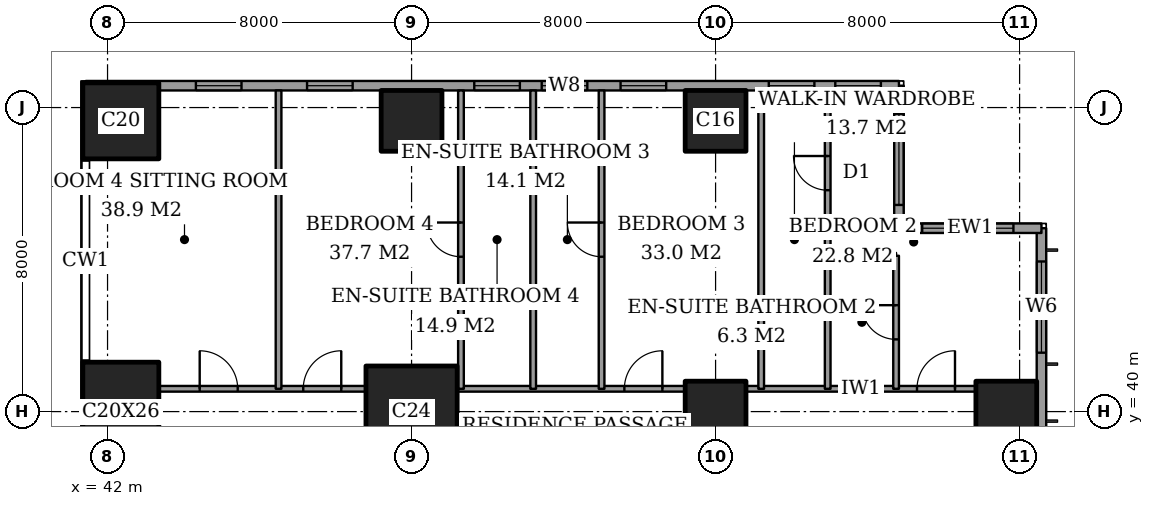
"""IFC4 building model, lengths in metres.
Left out: names, types, materials, properties, quantities, classifications, styles, units other than length and angle.
Written with IfcOpenShell. Run it as: python <this file> out.ifc"""

import sys

from ifc_helpers import new_model, si_unit, direction, frame, frame_2d, origin, origin_2d, place, context, subcontext, project, spatial, rectangle, extrude, element, fill, save


model = new_model("IFC4")
c1 = context("Model", 3, precision=1e-05, world=origin(), true_north=direction((0.0, 1.0)))
c2 = subcontext(c1, "Body", "Model", "MODEL_VIEW")
j1 = project(units=[si_unit("LENGTHUNIT", "METRE"), si_unit("PLANEANGLEUNIT", "RADIAN")], contexts=[c1])
p1 = place(None, origin())
s1 = spatial("IfcSite", under=j1, at=p1, CompositionType="ELEMENT")
p2 = place(p1, origin())
s2 = spatial("IfcBuilding", under=s1, at=p2, CompositionType="ELEMENT")
p3 = place(p2, frame((0.0, 0.0, 273.6)))
s3 = spatial("IfcBuildingStorey", under=s2, at=p3, CompositionType="ELEMENT", Elevation=273.6)
p4 = place(p3, frame((42.35, 40.0, 0.0), z_axis=(0.0, 0.0, 1.0), x_axis=(1.0, 0.0, 0.0)))
e1 = element("IfcColumn", 1, at=p4, inside=s3, PredefinedType="COLUMN", context=c2, shape_type="SweptSolid", body=[
    extrude(rectangle(XDim=2.0, YDim=2.6, at=origin_2d()), origin(), (0.0, 0.0, 1.0), 3.6),
])
p5 = place(p3, frame((42.35, 47.65, 0.0), z_axis=(0.0, 0.0, 1.0), x_axis=(1.0, 0.0, 0.0)))
e2 = element("IfcColumn", 2, at=p5, inside=s3, PredefinedType="COLUMN", context=c2, shape_type="SweptSolid", body=[
    extrude(rectangle(XDim=2.0, YDim=2.0, at=origin_2d()), origin(), (0.0, 0.0, 1.0), 3.6),
])
p6 = place(p3, frame((50.0, 40.0, 0.0), z_axis=(0.0, 0.0, 1.0), x_axis=(1.0, 0.0, 0.0)))
e3 = element("IfcColumn", 3, at=p6, inside=s3, PredefinedType="COLUMN", context=c2, shape_type="SweptSolid", body=[
    extrude(rectangle(XDim=2.4, YDim=2.4, at=origin_2d()), origin(), (0.0, 0.0, 1.0), 3.6),
])
for number, where, z_axis, x_axis in (
    (4, (50.0, 47.65, 0.0), (0.0, 0.0, 1.0), (1.0, 0.0, 0.0)),
    (5, (58.0, 40.0, 0.0), (0.0, 0.0, 1.0), (1.0, 0.0, 0.0)),
    (6, (58.0, 47.65, 0.0), (0.0, 0.0, 1.0), (1.0, 0.0, 0.0)),
    (7, (65.65, 40.0, 0.0), (0.0, 0.0, 1.0), (1.0, 0.0, 0.0)),
):
    element("IfcColumn", number, at=place(p3, frame(where, z_axis=z_axis, x_axis=x_axis)), inside=s3, PredefinedType="COLUMN", context=c2, shape_type="SweptSolid", body=[
        extrude(rectangle(XDim=1.6, YDim=1.6, at=origin_2d()), origin(), (0.0, 0.0, 1.0), 3.6),
    ])
p7 = place(p3, frame((66.575, 3.175, 0.0), z_axis=(0.0, 0.0, 1.0), x_axis=(0.0, 1.0, 0.0)))
e8 = element("IfcWall", 8, at=p7, inside=s3, PredefinedType="SOLIDWALL", context=c2, shape_type="SweptSolid", body=[
    extrude(rectangle(XDim=41.65, YDim=0.25, at=frame_2d((20.825, 0.0))), origin(), (0.0, 0.0, 1.0), 3.6),
])
p8 = place(p7, frame((0.875, 0.0, 0.6)))
e9 = element("IfcOpeningElement", 9, at=p8, cuts=e8, PredefinedType="OPENING", context=c2, shape_type="SweptSolid", body=[
    extrude(rectangle(XDim=2.4, YDim=2.0, at=frame_2d((1.2, 1.0))), frame((0.0, 0.135, 0.0), z_axis=(0.0, -1.0, 0.0), x_axis=(1.0, 0.0, 0.0)), (0.0, 0.0, 1.0), 0.27),
])
p9 = place(p7, frame((6.0, 0.0, 0.6)))
e10 = element("IfcOpeningElement", 10, at=p9, cuts=e8, PredefinedType="OPENING", context=c2, shape_type="SweptSolid", body=[
    extrude(rectangle(XDim=1.2, YDim=2.0, at=frame_2d((0.6, 1.0))), frame((0.0, 0.135, 0.0), z_axis=(0.0, -1.0, 0.0), x_axis=(1.0, 0.0, 0.0)), (0.0, 0.0, 1.0), 0.27),
])
p10 = place(p7, frame((8.525, 0.0, 0.6)))
e11 = element("IfcOpeningElement", 11, at=p10, cuts=e8, PredefinedType="OPENING", context=c2, shape_type="SweptSolid", body=[
    extrude(rectangle(XDim=2.4, YDim=2.0, at=frame_2d((1.2, 1.0))), frame((0.0, 0.135, 0.0), z_axis=(0.0, -1.0, 0.0), x_axis=(1.0, 0.0, 0.0)), (0.0, 0.0, 1.0), 0.27),
])
p11 = place(p7, frame((15.725, 0.0, 0.6)))
e12 = element("IfcOpeningElement", 12, at=p11, cuts=e8, PredefinedType="OPENING", context=c2, shape_type="SweptSolid", body=[
    extrude(rectangle(XDim=2.4, YDim=2.0, at=frame_2d((1.2, 1.0))), frame((0.0, 0.135, 0.0), z_axis=(0.0, -1.0, 0.0), x_axis=(1.0, 0.0, 0.0)), (0.0, 0.0, 1.0), 0.27),
])
p12 = place(p7, frame((23.625, 0.0, 0.6)))
e13 = element("IfcOpeningElement", 13, at=p12, cuts=e8, PredefinedType="OPENING", context=c2, shape_type="SweptSolid", body=[
    extrude(rectangle(XDim=2.4, YDim=2.0, at=frame_2d((1.2, 1.0))), frame((0.0, 0.135, 0.0), z_axis=(0.0, -1.0, 0.0), x_axis=(1.0, 0.0, 0.0)), (0.0, 0.0, 1.0), 0.27),
])
p13 = place(p7, frame((30.725, 0.0, 0.6)))
e14 = element("IfcOpeningElement", 14, at=p13, cuts=e8, PredefinedType="OPENING", context=c2, shape_type="SweptSolid", body=[
    extrude(rectangle(XDim=2.4, YDim=2.0, at=frame_2d((1.2, 1.0))), frame((0.0, 0.135, 0.0), z_axis=(0.0, -1.0, 0.0), x_axis=(1.0, 0.0, 0.0)), (0.0, 0.0, 1.0), 0.27),
])
p14 = place(p7, frame((34.525, 0.0, 0.6)))
e15 = element("IfcOpeningElement", 15, at=p14, cuts=e8, PredefinedType="OPENING", context=c2, shape_type="SweptSolid", body=[
    extrude(rectangle(XDim=1.2, YDim=2.0, at=frame_2d((0.6, 1.0))), frame((0.0, 0.135, 0.0), z_axis=(0.0, -1.0, 0.0), x_axis=(1.0, 0.0, 0.0)), (0.0, 0.0, 1.0), 0.27),
])
p15 = place(p7, frame((38.375, 0.0, 0.6)))
e16 = element("IfcOpeningElement", 16, at=p15, cuts=e8, PredefinedType="OPENING", context=c2, shape_type="SweptSolid", body=[
    extrude(rectangle(XDim=2.4, YDim=2.0, at=frame_2d((1.2, 1.0))), frame((0.0, 0.135, 0.0), z_axis=(0.0, -1.0, 0.0), x_axis=(1.0, 0.0, 0.0)), (0.0, 0.0, 1.0), 0.27),
])
p16 = place(p3, frame((66.575, 44.825, 0.0), z_axis=(0.0, 0.0, 1.0), x_axis=(-1.0, 0.0, 0.0)))
e17 = element("IfcWall", 17, at=p16, inside=s3, PredefinedType="SOLIDWALL", context=c2, shape_type="SweptSolid", body=[
    extrude(rectangle(XDim=3.75, YDim=0.25, at=frame_2d((1.875, 0.0))), origin(), (0.0, 0.0, 1.0), 3.6),
])
p17 = place(p16, frame((0.738, 0.0, 0.6)))
e18 = element("IfcOpeningElement", 18, at=p17, cuts=e17, PredefinedType="OPENING", context=c2, shape_type="SweptSolid", body=[
    extrude(rectangle(XDim=2.4, YDim=2.0, at=frame_2d((1.2, 1.0))), frame((0.0, 0.135, 0.0), z_axis=(0.0, -1.0, 0.0), x_axis=(1.0, 0.0, 0.0)), (0.0, 0.0, 1.0), 0.27),
])
p18 = place(p3, frame((62.825, 44.825, 0.0), z_axis=(0.0, 0.0, 1.0), x_axis=(0.0, 1.0, 0.0)))
e19 = element("IfcWall", 19, at=p18, inside=s3, PredefinedType="SOLIDWALL", context=c2, shape_type="SweptSolid", body=[
    extrude(rectangle(XDim=3.75, YDim=0.25, at=frame_2d((1.875, 0.0))), origin(), (0.0, 0.0, 1.0), 3.6),
])
p19 = place(p18, frame((0.613, 0.0, 0.6)))
e20 = element("IfcOpeningElement", 20, at=p19, cuts=e19, PredefinedType="OPENING", context=c2, shape_type="SweptSolid", body=[
    extrude(rectangle(XDim=2.4, YDim=2.0, at=frame_2d((1.2, 1.0))), frame((0.0, 0.135, 0.0), z_axis=(0.0, -1.0, 0.0), x_axis=(1.0, 0.0, 0.0)), (0.0, 0.0, 1.0), 0.27),
])
p20 = place(p3, frame((62.825, 48.575, 0.0), z_axis=(0.0, 0.0, 1.0), x_axis=(-1.0, 0.0, 0.0)))
e21 = element("IfcWall", 21, at=p20, inside=s3, PredefinedType="SOLIDWALL", context=c2, shape_type="SweptSolid", body=[
    extrude(rectangle(XDim=21.4, YDim=0.25, at=frame_2d((10.7, 0.0))), origin(), (0.0, 0.0, 1.0), 3.6),
])
p21 = place(p20, frame((0.475, 0.0, 0.6)))
e22 = element("IfcOpeningElement", 22, at=p21, cuts=e21, PredefinedType="OPENING", context=c2, shape_type="SweptSolid", body=[
    extrude(rectangle(XDim=1.2, YDim=2.0, at=frame_2d((0.6, 1.0))), frame((0.0, 0.135, 0.0), z_axis=(0.0, -1.0, 0.0), x_axis=(1.0, 0.0, 0.0)), (0.0, 0.0, 1.0), 0.27),
])
p22 = place(p20, frame((2.225, 0.0, 0.6)))
e23 = element("IfcOpeningElement", 23, at=p22, cuts=e21, PredefinedType="OPENING", context=c2, shape_type="SweptSolid", body=[
    extrude(rectangle(XDim=1.2, YDim=2.0, at=frame_2d((0.6, 1.0))), frame((0.0, 0.135, 0.0), z_axis=(0.0, -1.0, 0.0), x_axis=(1.0, 0.0, 0.0)), (0.0, 0.0, 1.0), 0.27),
])
p23 = place(p20, frame((6.125, 0.0, 0.6)))
e24 = element("IfcOpeningElement", 24, at=p23, cuts=e21, PredefinedType="OPENING", context=c2, shape_type="SweptSolid", body=[
    extrude(rectangle(XDim=1.2, YDim=2.0, at=frame_2d((0.6, 1.0))), frame((0.0, 0.135, 0.0), z_axis=(0.0, -1.0, 0.0), x_axis=(1.0, 0.0, 0.0)), (0.0, 0.0, 1.0), 0.27),
])
p24 = place(p20, frame((8.2, 0.0, 0.6)))
e25 = element("IfcOpeningElement", 25, at=p24, cuts=e21, PredefinedType="OPENING", context=c2, shape_type="SweptSolid", body=[
    extrude(rectangle(XDim=1.2, YDim=2.0, at=frame_2d((0.6, 1.0))), frame((0.0, 0.135, 0.0), z_axis=(0.0, -1.0, 0.0), x_axis=(1.0, 0.0, 0.0)), (0.0, 0.0, 1.0), 0.27),
])
p25 = place(p20, frame((9.975, 0.0, 0.6)))
e26 = element("IfcOpeningElement", 26, at=p25, cuts=e21, PredefinedType="OPENING", context=c2, shape_type="SweptSolid", body=[
    extrude(rectangle(XDim=1.2, YDim=2.0, at=frame_2d((0.6, 1.0))), frame((0.0, 0.135, 0.0), z_axis=(0.0, -1.0, 0.0), x_axis=(1.0, 0.0, 0.0)), (0.0, 0.0, 1.0), 0.27),
])
p26 = place(p20, frame((14.375, 0.0, 0.6)))
e27 = element("IfcOpeningElement", 27, at=p26, cuts=e21, PredefinedType="OPENING", context=c2, shape_type="SweptSolid", body=[
    extrude(rectangle(XDim=1.2, YDim=2.0, at=frame_2d((0.6, 1.0))), frame((0.0, 0.135, 0.0), z_axis=(0.0, -1.0, 0.0), x_axis=(1.0, 0.0, 0.0)), (0.0, 0.0, 1.0), 0.27),
])
p27 = place(p20, frame((17.3, 0.0, 0.6)))
e28 = element("IfcOpeningElement", 28, at=p27, cuts=e21, PredefinedType="OPENING", context=c2, shape_type="SweptSolid", body=[
    extrude(rectangle(XDim=1.2, YDim=2.0, at=frame_2d((0.6, 1.0))), frame((0.0, 0.135, 0.0), z_axis=(0.0, -1.0, 0.0), x_axis=(1.0, 0.0, 0.0)), (0.0, 0.0, 1.0), 0.27),
])
p28 = place(p3, frame((43.35, 40.6, 0.0), z_axis=(0.0, 0.0, 1.0), x_axis=(1.0, 0.0, 0.0)))
e29 = element("IfcWall", 29, at=p28, inside=s3, PredefinedType="PARTITIONING", context=c2, shape_type="SweptSolid", body=[
    extrude(rectangle(XDim=5.45, YDim=0.15, at=frame_2d((2.725, 0.0))), origin(), (0.0, 0.0, 1.0), 3.25),
])
p29 = place(p28, frame((3.8, 0.0, 0.0)))
e30 = element("IfcOpeningElement", 30, at=p29, cuts=e29, PredefinedType="OPENING", context=c2, shape_type="SweptSolid", body=[
    extrude(rectangle(XDim=1.0, YDim=2.1, at=frame_2d((0.5, 1.05))), frame((0.0, 0.085, 0.0), z_axis=(0.0, -1.0, 0.0), x_axis=(1.0, 0.0, 0.0)), (0.0, 0.0, 1.0), 0.17),
])
p30 = place(p28, frame((1.075, 0.0, 0.0)))
e31 = element("IfcOpeningElement", 31, at=p30, cuts=e29, PredefinedType="OPENING", context=c2, shape_type="SweptSolid", body=[
    extrude(rectangle(XDim=1.0, YDim=2.1, at=frame_2d((0.5, 1.05))), frame((0.0, 0.085, 0.0), z_axis=(0.0, -1.0, 0.0), x_axis=(1.0, 0.0, 0.0)), (0.0, 0.0, 1.0), 0.17),
])
p31 = place(p3, frame((51.2, 40.6, 0.0), z_axis=(0.0, 0.0, 1.0), x_axis=(1.0, 0.0, 0.0)))
e32 = element("IfcWall", 32, at=p31, inside=s3, PredefinedType="PARTITIONING", context=c2, shape_type="SweptSolid", body=[
    extrude(rectangle(XDim=6.0, YDim=0.15, at=frame_2d((3.0, 0.0))), origin(), (0.0, 0.0, 1.0), 3.25),
])
p32 = place(p31, frame((4.4, 0.0, 0.0)))
e33 = element("IfcOpeningElement", 33, at=p32, cuts=e32, PredefinedType="OPENING", context=c2, shape_type="SweptSolid", body=[
    extrude(rectangle(XDim=1.0, YDim=2.1, at=frame_2d((0.5, 1.05))), frame((0.0, 0.085, 0.0), z_axis=(0.0, -1.0, 0.0), x_axis=(1.0, 0.0, 0.0)), (0.0, 0.0, 1.0), 0.17),
])
p33 = place(p3, frame((58.8, 40.6, 0.0), z_axis=(0.0, 0.0, 1.0), x_axis=(1.0, 0.0, 0.0)))
e34 = element("IfcWall", 34, at=p33, inside=s3, PredefinedType="PARTITIONING", context=c2, shape_type="SweptSolid", body=[
    extrude(rectangle(XDim=6.05, YDim=0.15, at=frame_2d((3.025, 0.0))), origin(), (0.0, 0.0, 1.0), 3.25),
])
p34 = place(p33, frame((4.5, 0.0, 0.0)))
e35 = element("IfcOpeningElement", 35, at=p34, cuts=e34, PredefinedType="OPENING", context=c2, shape_type="SweptSolid", body=[
    extrude(rectangle(XDim=1.0, YDim=2.1, at=frame_2d((0.5, 1.05))), frame((0.0, 0.085, 0.0), z_axis=(0.0, -1.0, 0.0), x_axis=(1.0, 0.0, 0.0)), (0.0, 0.0, 1.0), 0.17),
])
p35 = place(p3, frame((60.95, 44.1, 0.0), z_axis=(0.0, 0.0, 1.0), x_axis=(1.0, 0.0, 0.0)))
e36 = element("IfcWall", 36, at=p35, inside=s3, PredefinedType="PARTITIONING", context=c2, shape_type="SweptSolid", body=[
    extrude(rectangle(XDim=1.8, YDim=0.15, at=frame_2d((0.9, 0.0))), origin(), (0.0, 0.0, 1.0), 3.25),
])
p36 = place(p3, frame((46.5, 40.6, 0.0), z_axis=(0.0, 0.0, 1.0), x_axis=(0.0, 1.0, 0.0)))
e37 = element("IfcWall", 37, at=p36, inside=s3, PredefinedType="PARTITIONING", context=c2, shape_type="SweptSolid", body=[
    extrude(rectangle(XDim=7.85, YDim=0.15, at=frame_2d((3.925, 0.0))), origin(), (0.0, 0.0, 1.0), 3.25),
])
p37 = place(p3, frame((51.3, 40.6, 0.0), z_axis=(0.0, 0.0, 1.0), x_axis=(0.0, 1.0, 0.0)))
e38 = element("IfcWall", 38, at=p37, inside=s3, PredefinedType="PARTITIONING", context=c2, shape_type="SweptSolid", body=[
    extrude(rectangle(XDim=7.85, YDim=0.15, at=frame_2d((3.925, 0.0))), origin(), (0.0, 0.0, 1.0), 3.25),
])
p38 = place(p37, frame((3.475, 0.0, 0.0)))
e39 = element("IfcOpeningElement", 39, at=p38, cuts=e38, PredefinedType="OPENING", context=c2, shape_type="SweptSolid", body=[
    extrude(rectangle(XDim=0.9, YDim=2.1, at=frame_2d((0.45, 1.05))), frame((0.0, 0.085, 0.0), z_axis=(0.0, -1.0, 0.0), x_axis=(1.0, 0.0, 0.0)), (0.0, 0.0, 1.0), 0.17),
])
p39 = place(p3, frame((53.2, 40.6, 0.0), z_axis=(0.0, 0.0, 1.0), x_axis=(0.0, 1.0, 0.0)))
e40 = element("IfcWall", 40, at=p39, inside=s3, PredefinedType="PARTITIONING", context=c2, shape_type="SweptSolid", body=[
    extrude(rectangle(XDim=7.85, YDim=0.15, at=frame_2d((3.925, 0.0))), origin(), (0.0, 0.0, 1.0), 3.25),
])
p40 = place(p3, frame((55.0, 40.6, 0.0), z_axis=(0.0, 0.0, 1.0), x_axis=(0.0, 1.0, 0.0)))
e41 = element("IfcWall", 41, at=p40, inside=s3, PredefinedType="PARTITIONING", context=c2, shape_type="SweptSolid", body=[
    extrude(rectangle(XDim=7.85, YDim=0.15, at=frame_2d((3.925, 0.0))), origin(), (0.0, 0.0, 1.0), 3.25),
])
p41 = place(p40, frame((3.475, 0.0, 0.0)))
e42 = element("IfcOpeningElement", 42, at=p41, cuts=e41, PredefinedType="OPENING", context=c2, shape_type="SweptSolid", body=[
    extrude(rectangle(XDim=0.9, YDim=2.1, at=frame_2d((0.45, 1.05))), frame((0.0, 0.085, 0.0), z_axis=(0.0, -1.0, 0.0), x_axis=(1.0, 0.0, 0.0)), (0.0, 0.0, 1.0), 0.17),
])
p42 = place(p3, frame((59.2, 40.6, 0.0), z_axis=(0.0, 0.0, 1.0), x_axis=(0.0, 1.0, 0.0)))
e43 = element("IfcWall", 43, at=p42, inside=s3, PredefinedType="PARTITIONING", context=c2, shape_type="SweptSolid", body=[
    extrude(rectangle(XDim=7.85, YDim=0.15, at=frame_2d((3.925, 0.0))), origin(), (0.0, 0.0, 1.0), 3.25),
])
p43 = place(p3, frame((60.95, 40.6, 0.0), z_axis=(0.0, 0.0, 1.0), x_axis=(0.0, 1.0, 0.0)))
e44 = element("IfcWall", 44, at=p43, inside=s3, PredefinedType="PARTITIONING", context=c2, shape_type="SweptSolid", body=[
    extrude(rectangle(XDim=7.85, YDim=0.15, at=frame_2d((3.925, 0.0))), origin(), (0.0, 0.0, 1.0), 3.25),
])
p44 = place(p43, frame((5.225, 0.0, 0.0)))
e45 = element("IfcOpeningElement", 45, at=p44, cuts=e44, PredefinedType="OPENING", context=c2, shape_type="SweptSolid", body=[
    extrude(rectangle(XDim=0.9, YDim=2.1, at=frame_2d((0.45, 1.05))), frame((0.0, 0.085, 0.0), z_axis=(0.0, -1.0, 0.0), x_axis=(1.0, 0.0, 0.0)), (0.0, 0.0, 1.0), 0.17),
])
p45 = place(p3, frame((62.75, 40.6, 0.0), z_axis=(0.0, 0.0, 1.0), x_axis=(0.0, 1.0, 0.0)))
e46 = element("IfcWall", 46, at=p45, inside=s3, PredefinedType="PARTITIONING", context=c2, shape_type="SweptSolid", body=[
    extrude(rectangle(XDim=3.5, YDim=0.15, at=frame_2d((1.75, 0.0))), origin(), (0.0, 0.0, 1.0), 3.25),
])
p46 = place(p45, frame((1.3, 0.0, 0.0)))
e47 = element("IfcOpeningElement", 47, at=p46, cuts=e46, PredefinedType="OPENING", context=c2, shape_type="SweptSolid", body=[
    extrude(rectangle(XDim=0.9, YDim=2.1, at=frame_2d((0.45, 1.05))), frame((0.0, 0.085, 0.0), z_axis=(0.0, -1.0, 0.0), x_axis=(1.0, 0.0, 0.0)), (0.0, 0.0, 1.0), 0.17),
])
p47 = place(p15, origin())
e48 = element("IfcWindow", 48, at=p47, inside=s3, PartitioningType="SINGLE_PANEL", PredefinedType="WINDOW", context=c2, shape_type="SweptSolid", body=[
    extrude(rectangle(XDim=2.4, YDim=2.0, at=frame_2d((1.2, 1.0))), frame((0.0, 0.03, 0.0), z_axis=(0.0, -1.0, 0.0), x_axis=(1.0, 0.0, 0.0)), (0.0, 0.0, 1.0), 0.06),
])
fill(e16, e48)
p48 = place(p17, origin())
e49 = element("IfcWindow", 49, at=p48, inside=s3, PartitioningType="SINGLE_PANEL", PredefinedType="WINDOW", context=c2, shape_type="SweptSolid", body=[
    extrude(rectangle(XDim=2.4, YDim=2.0, at=frame_2d((1.2, 1.0))), frame((0.0, 0.03, 0.0), z_axis=(0.0, -1.0, 0.0), x_axis=(1.0, 0.0, 0.0)), (0.0, 0.0, 1.0), 0.06),
])
fill(e18, e49)
p49 = place(p19, origin())
e50 = element("IfcWindow", 50, at=p49, inside=s3, PartitioningType="SINGLE_PANEL", PredefinedType="WINDOW", context=c2, shape_type="SweptSolid", body=[
    extrude(rectangle(XDim=2.4, YDim=2.0, at=frame_2d((1.2, 1.0))), frame((0.0, 0.03, 0.0), z_axis=(0.0, -1.0, 0.0), x_axis=(1.0, 0.0, 0.0)), (0.0, 0.0, 1.0), 0.06),
])
fill(e20, e50)
p50 = place(p21, origin())
e51 = element("IfcWindow", 51, at=p50, inside=s3, PartitioningType="SINGLE_PANEL", PredefinedType="WINDOW", context=c2, shape_type="SweptSolid", body=[
    extrude(rectangle(XDim=1.2, YDim=2.0, at=frame_2d((0.6, 1.0))), frame((0.0, 0.03, 0.0), z_axis=(0.0, -1.0, 0.0), x_axis=(1.0, 0.0, 0.0)), (0.0, 0.0, 1.0), 0.06),
])
fill(e22, e51)
p51 = place(p22, origin())
e52 = element("IfcWindow", 52, at=p51, inside=s3, PartitioningType="SINGLE_PANEL", PredefinedType="WINDOW", context=c2, shape_type="SweptSolid", body=[
    extrude(rectangle(XDim=1.2, YDim=2.0, at=frame_2d((0.6, 1.0))), frame((0.0, 0.03, 0.0), z_axis=(0.0, -1.0, 0.0), x_axis=(1.0, 0.0, 0.0)), (0.0, 0.0, 1.0), 0.06),
])
fill(e23, e52)
p52 = place(p23, origin())
e53 = element("IfcWindow", 53, at=p52, inside=s3, PartitioningType="SINGLE_PANEL", PredefinedType="WINDOW", context=c2, shape_type="SweptSolid", body=[
    extrude(rectangle(XDim=1.2, YDim=2.0, at=frame_2d((0.6, 1.0))), frame((0.0, 0.03, 0.0), z_axis=(0.0, -1.0, 0.0), x_axis=(1.0, 0.0, 0.0)), (0.0, 0.0, 1.0), 0.06),
])
fill(e24, e53)
p53 = place(p24, origin())
e54 = element("IfcWindow", 54, at=p53, inside=s3, PartitioningType="SINGLE_PANEL", PredefinedType="WINDOW", context=c2, shape_type="SweptSolid", body=[
    extrude(rectangle(XDim=1.2, YDim=2.0, at=frame_2d((0.6, 1.0))), frame((0.0, 0.03, 0.0), z_axis=(0.0, -1.0, 0.0), x_axis=(1.0, 0.0, 0.0)), (0.0, 0.0, 1.0), 0.06),
])
fill(e25, e54)
p54 = place(p25, origin())
e55 = element("IfcWindow", 55, at=p54, inside=s3, PartitioningType="SINGLE_PANEL", PredefinedType="WINDOW", context=c2, shape_type="SweptSolid", body=[
    extrude(rectangle(XDim=1.2, YDim=2.0, at=frame_2d((0.6, 1.0))), frame((0.0, 0.03, 0.0), z_axis=(0.0, -1.0, 0.0), x_axis=(1.0, 0.0, 0.0)), (0.0, 0.0, 1.0), 0.06),
])
fill(e26, e55)
p55 = place(p26, origin())
e56 = element("IfcWindow", 56, at=p55, inside=s3, PartitioningType="SINGLE_PANEL", PredefinedType="WINDOW", context=c2, shape_type="SweptSolid", body=[
    extrude(rectangle(XDim=1.2, YDim=2.0, at=frame_2d((0.6, 1.0))), frame((0.0, 0.03, 0.0), z_axis=(0.0, -1.0, 0.0), x_axis=(1.0, 0.0, 0.0)), (0.0, 0.0, 1.0), 0.06),
])
fill(e27, e56)
p56 = place(p27, origin())
e57 = element("IfcWindow", 57, at=p56, inside=s3, PartitioningType="SINGLE_PANEL", PredefinedType="WINDOW", context=c2, shape_type="SweptSolid", body=[
    extrude(rectangle(XDim=1.2, YDim=2.0, at=frame_2d((0.6, 1.0))), frame((0.0, 0.03, 0.0), z_axis=(0.0, -1.0, 0.0), x_axis=(1.0, 0.0, 0.0)), (0.0, 0.0, 1.0), 0.06),
])
fill(e28, e57)
p57 = place(p46, origin())
e58 = element("IfcDoor", 58, at=p57, inside=s3, OperationType="SINGLE_SWING_LEFT", PredefinedType="DOOR", context=c2, shape_type="SweptSolid", body=[
    extrude(rectangle(XDim=0.9, YDim=2.1, at=frame_2d((0.45, 1.05))), frame((0.0, 0.025, 0.0), z_axis=(0.0, -1.0, 0.0), x_axis=(1.0, 0.0, 0.0)), (0.0, 0.0, 1.0), 0.05),
])
fill(e47, e58)
p58 = place(p34, origin())
e59 = element("IfcDoor", 59, at=p58, inside=s3, OperationType="SINGLE_SWING_LEFT", PredefinedType="DOOR", context=c2, shape_type="SweptSolid", body=[
    extrude(rectangle(XDim=1.0, YDim=2.1, at=frame_2d((0.5, 1.05))), frame((0.0, 0.025, 0.0), z_axis=(0.0, -1.0, 0.0), x_axis=(1.0, 0.0, 0.0)), (0.0, 0.0, 1.0), 0.05),
])
fill(e35, e59)
p59 = place(p44, origin())
e60 = element("IfcDoor", 60, at=p59, inside=s3, OperationType="SINGLE_SWING_LEFT", PredefinedType="DOOR", context=c2, shape_type="SweptSolid", body=[
    extrude(rectangle(XDim=0.9, YDim=2.1, at=frame_2d((0.45, 1.05))), frame((0.0, 0.025, 0.0), z_axis=(0.0, -1.0, 0.0), x_axis=(1.0, 0.0, 0.0)), (0.0, 0.0, 1.0), 0.05),
])
fill(e45, e60)
p60 = place(p32, origin())
e61 = element("IfcDoor", 61, at=p60, inside=s3, OperationType="SINGLE_SWING_LEFT", PredefinedType="DOOR", context=c2, shape_type="SweptSolid", body=[
    extrude(rectangle(XDim=1.0, YDim=2.1, at=frame_2d((0.5, 1.05))), frame((0.0, 0.025, 0.0), z_axis=(0.0, -1.0, 0.0), x_axis=(1.0, 0.0, 0.0)), (0.0, 0.0, 1.0), 0.05),
])
fill(e33, e61)
p61 = place(p41, origin())
e62 = element("IfcDoor", 62, at=p61, inside=s3, OperationType="SINGLE_SWING_LEFT", PredefinedType="DOOR", context=c2, shape_type="SweptSolid", body=[
    extrude(rectangle(XDim=0.9, YDim=2.1, at=frame_2d((0.45, 1.05))), frame((0.0, 0.025, 0.0), z_axis=(0.0, -1.0, 0.0), x_axis=(1.0, 0.0, 0.0)), (0.0, 0.0, 1.0), 0.05),
])
fill(e42, e62)
p62 = place(p38, origin())
e63 = element("IfcDoor", 63, at=p62, inside=s3, OperationType="SINGLE_SWING_LEFT", PredefinedType="DOOR", context=c2, shape_type="SweptSolid", body=[
    extrude(rectangle(XDim=0.9, YDim=2.1, at=frame_2d((0.45, 1.05))), frame((0.0, 0.025, 0.0), z_axis=(0.0, -1.0, 0.0), x_axis=(1.0, 0.0, 0.0)), (0.0, 0.0, 1.0), 0.05),
])
fill(e39, e63)
p63 = place(p29, origin())
e64 = element("IfcDoor", 64, at=p63, inside=s3, OperationType="SINGLE_SWING_LEFT", PredefinedType="DOOR", context=c2, shape_type="SweptSolid", body=[
    extrude(rectangle(XDim=1.0, YDim=2.1, at=frame_2d((0.5, 1.05))), frame((0.0, 0.025, 0.0), z_axis=(0.0, -1.0, 0.0), x_axis=(1.0, 0.0, 0.0)), (0.0, 0.0, 1.0), 0.05),
])
fill(e30, e64)
p64 = place(p30, origin())
e65 = element("IfcDoor", 65, at=p64, inside=s3, OperationType="SINGLE_SWING_RIGHT", PredefinedType="DOOR", context=c2, shape_type="SweptSolid", body=[
    extrude(rectangle(XDim=1.0, YDim=2.1, at=frame_2d((0.5, 1.05))), frame((0.0, 0.025, 0.0), z_axis=(0.0, -1.0, 0.0), x_axis=(1.0, 0.0, 0.0)), (0.0, 0.0, 1.0), 0.05),
])
fill(e31, e65)
save(model, sys.argv[1])
